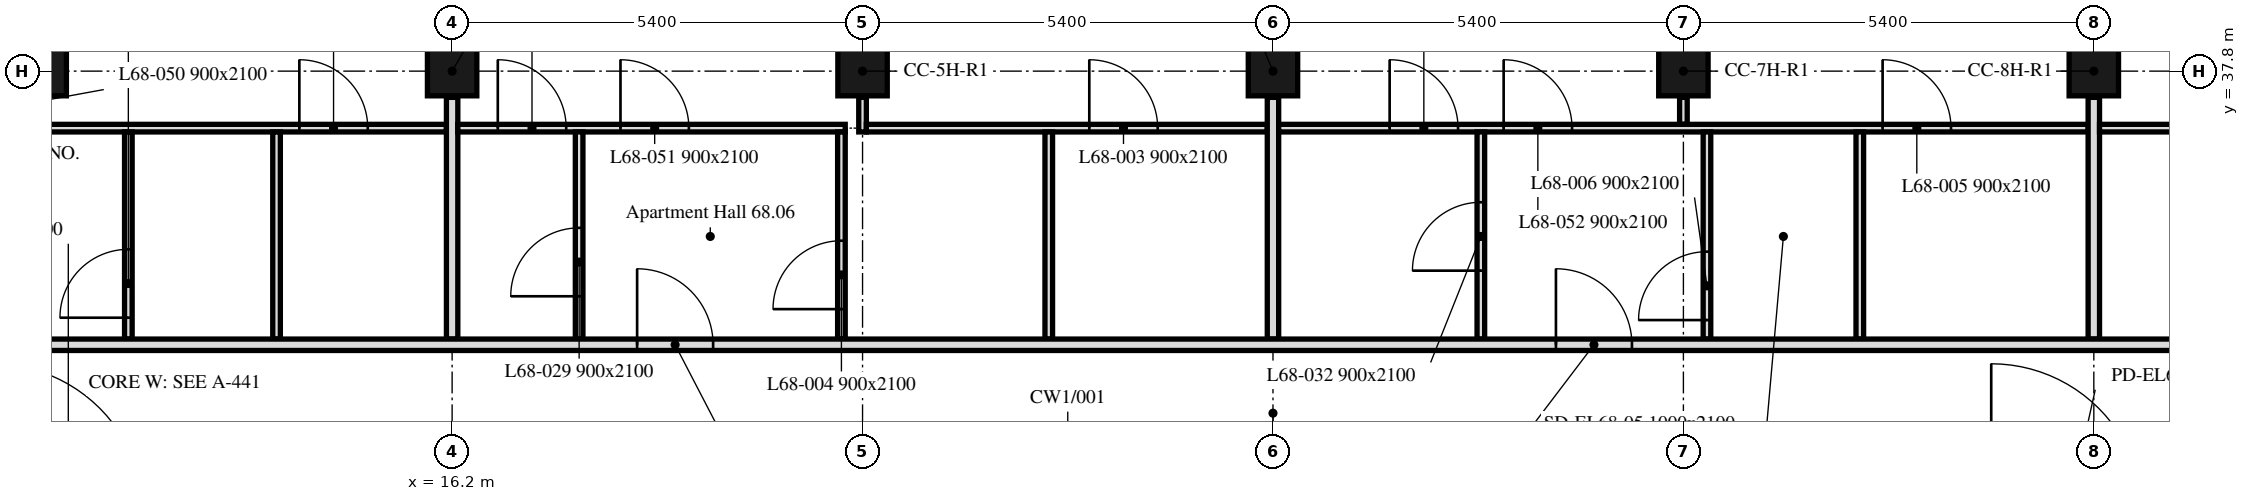
"""IFC4 building model, lengths in metres.
Left out: names, types, materials, properties, quantities, classifications, styles, units other than length and angle.
Written with IfcOpenShell. Run it as: python <this file> out.ifc"""

import sys

from ifc_helpers import new_model, si_unit, direction, frame, frame_2d, origin, origin_2d, place, context, subcontext, project, spatial, rectangle, extrude, element, fill, save


model = new_model("IFC4")
c1 = context("Model", 3, precision=1e-05, world=origin(), true_north=direction((0.0, 1.0)))
c2 = subcontext(c1, "Body", "Model", "MODEL_VIEW")
j1 = project(units=[si_unit("LENGTHUNIT", "METRE"), si_unit("PLANEANGLEUNIT", "RADIAN")], contexts=[c1])
p1 = place(None, origin())
s1 = spatial("IfcSite", under=j1, at=p1, CompositionType="ELEMENT")
p2 = place(p1, origin())
s2 = spatial("IfcBuilding", under=s1, at=p2, CompositionType="ELEMENT")
p3 = place(p2, frame((0.0, 0.0, 278.5)))
s3 = spatial("IfcBuildingStorey", under=s2, at=p3, CompositionType="ELEMENT", Elevation=278.5)
for number, where, z_axis, x_axis in (
    (1, (10.8, 37.8, 0.0), (0.0, 0.0, 1.0), (1.0, 0.0, 0.0)),
    (2, (16.2, 37.8, 0.0), (0.0, 0.0, 1.0), (1.0, 0.0, 0.0)),
    (3, (21.6, 37.8, 0.0), (0.0, 0.0, 1.0), (1.0, 0.0, 0.0)),
    (4, (27.0, 37.8, 0.0), (0.0, 0.0, 1.0), (1.0, 0.0, 0.0)),
    (5, (32.4, 37.8, 0.0), (0.0, 0.0, 1.0), (1.0, 0.0, 0.0)),
    (6, (37.8, 37.8, 0.0), (0.0, 0.0, 1.0), (1.0, 0.0, 0.0)),
):
    element("IfcColumn", number, at=place(p3, frame(where, z_axis=z_axis, x_axis=x_axis)), inside=s3, PredefinedType="COLUMN", context=c2, shape_type="SweptSolid", body=[
        extrude(rectangle(XDim=0.65, YDim=0.65, at=origin_2d()), origin(), (0.0, 0.0, 1.0), 3.0),
    ])
p4 = place(p3, frame((10.949, 42.501, 0.0), z_axis=(0.0, 0.0, 1.0), x_axis=(-0.707106781187, -0.707106781187, 0.0)))
e7 = element("IfcWall", 7, at=p4, inside=s3, PredefinedType="SOLIDWALL", context=c2, shape_type="SweptSolid", body=[
    extrude(rectangle(XDim=6.86, YDim=0.3, at=frame_2d((3.43, 0.0))), origin(), (0.0, 0.0, 1.0), 3.0),
])
p5 = place(p4, frame((1.73, 0.0, 0.9)))
e8 = element("IfcOpeningElement", 8, at=p5, cuts=e7, PredefinedType="OPENING", context=c2, shape_type="SweptSolid", body=[
    extrude(rectangle(XDim=3.4, YDim=1.7, at=frame_2d((1.7, 0.85))), frame((0.0, 0.16, 0.0), z_axis=(0.0, -1.0, 0.0), x_axis=(1.0, 0.0, 0.0)), (0.0, 0.0, 1.0), 0.32),
])
p6 = place(p3, frame((6.151, 37.05, 0.0), z_axis=(0.0, 0.0, 1.0), x_axis=(1.0, 0.0, 0.0)))
e9 = element("IfcWall", 9, at=p6, inside=s3, PredefinedType="PARTITIONING", context=c2, shape_type="SweptSolid", body=[
    extrude(rectangle(XDim=9.974, YDim=0.1, at=frame_2d((4.987, 0.0))), origin(), (0.0, 0.0, 1.0), 3.0),
])
p7 = place(p6, frame((8.039, 0.0, 0.0)))
e10 = element("IfcOpeningElement", 10, at=p7, cuts=e9, PredefinedType="OPENING", context=c2, shape_type="SweptSolid", body=[
    extrude(rectangle(XDim=0.9, YDim=2.1, at=frame_2d((0.45, 1.05))), frame((0.0, 0.05, 0.0), z_axis=(0.0, -1.0, 0.0), x_axis=(1.0, 0.0, 0.0)), (0.0, 0.0, 1.0), 0.1),
])
p8 = place(p6, frame((0.879, 0.0, 0.0)))
e11 = element("IfcOpeningElement", 11, at=p8, cuts=e9, PredefinedType="OPENING", context=c2, shape_type="SweptSolid", body=[
    extrude(rectangle(XDim=0.9, YDim=2.1, at=frame_2d((0.45, 1.05))), frame((0.0, 0.05, 0.0), z_axis=(0.0, -1.0, 0.0), x_axis=(1.0, 0.0, 0.0)), (0.0, 0.0, 1.0), 0.1),
])
p9 = place(p6, frame((2.249, 0.0, 0.0)))
e12 = element("IfcOpeningElement", 12, at=p9, cuts=e9, PredefinedType="OPENING", context=c2, shape_type="SweptSolid", body=[
    extrude(rectangle(XDim=0.9, YDim=2.1, at=frame_2d((0.45, 1.05))), frame((0.0, 0.05, 0.0), z_axis=(0.0, -1.0, 0.0), x_axis=(1.0, 0.0, 0.0)), (0.0, 0.0, 1.0), 0.1),
])
p10 = place(p3, frame((11.94, 34.275, 0.0), z_axis=(0.0, 0.0, 1.0), x_axis=(0.0, 1.0, 0.0)))
e13 = element("IfcWall", 13, at=p10, inside=s3, PredefinedType="PARTITIONING", context=c2, shape_type="SweptSolid", body=[
    extrude(rectangle(XDim=2.725, YDim=0.1, at=frame_2d((1.363, 0.0))), origin(), (0.0, 0.0, 1.0), 3.0),
])
p11 = place(p10, frame((0.281, 0.0, 0.0)))
e14 = element("IfcOpeningElement", 14, at=p11, cuts=e13, PredefinedType="OPENING", context=c2, shape_type="SweptSolid", body=[
    extrude(rectangle(XDim=0.9, YDim=2.1, at=frame_2d((0.45, 1.05))), frame((0.0, 0.05, 0.0), z_axis=(0.0, -1.0, 0.0), x_axis=(1.0, 0.0, 0.0)), (0.0, 0.0, 1.0), 0.1),
])
p12 = place(p3, frame((13.89, 34.275, 0.0), z_axis=(0.0, 0.0, 1.0), x_axis=(0.0, 1.0, 0.0)))
e15 = element("IfcWall", 15, at=p12, inside=s3, PredefinedType="PARTITIONING", context=c2, shape_type="SweptSolid", body=[
    extrude(rectangle(XDim=2.725, YDim=0.1, at=frame_2d((1.363, 0.0))), origin(), (0.0, 0.0, 1.0), 3.0),
])
p13 = place(p3, frame((16.2, 34.275, 0.0), z_axis=(0.0, 0.0, 1.0), x_axis=(0.0, 1.0, 0.0)))
e16 = element("IfcWall", 16, at=p13, inside=s3, PredefinedType="PARTITIONING", context=c2, shape_type="SweptSolid", body=[
    extrude(rectangle(XDim=3.18, YDim=0.15, at=frame_2d((1.59, 0.0))), origin(), (0.0, 0.0, 1.0), 3.0),
])
p14 = place(p3, frame((16.275, 37.05, 0.0), z_axis=(0.0, 0.0, 1.0), x_axis=(1.0, 0.0, 0.0)))
e17 = element("IfcWall", 17, at=p14, inside=s3, PredefinedType="PARTITIONING", context=c2, shape_type="SweptSolid", body=[
    extrude(rectangle(XDim=5.097, YDim=0.1, at=frame_2d((2.549, 0.0))), origin(), (0.0, 0.0, 1.0), 3.0),
])
p15 = place(p14, frame((0.526, 0.0, 0.0)))
e18 = element("IfcOpeningElement", 18, at=p15, cuts=e17, PredefinedType="OPENING", context=c2, shape_type="SweptSolid", body=[
    extrude(rectangle(XDim=0.9, YDim=2.1, at=frame_2d((0.45, 1.05))), frame((0.0, 0.05, 0.0), z_axis=(0.0, -1.0, 0.0), x_axis=(1.0, 0.0, 0.0)), (0.0, 0.0, 1.0), 0.1),
])
p16 = place(p14, frame((2.14, 0.0, 0.0)))
e19 = element("IfcOpeningElement", 19, at=p16, cuts=e17, PredefinedType="OPENING", context=c2, shape_type="SweptSolid", body=[
    extrude(rectangle(XDim=0.9, YDim=2.1, at=frame_2d((0.45, 1.05))), frame((0.0, 0.05, 0.0), z_axis=(0.0, -1.0, 0.0), x_axis=(1.0, 0.0, 0.0)), (0.0, 0.0, 1.0), 0.1),
])
p17 = place(p3, frame((21.6, 37.0, 0.0), z_axis=(0.0, 0.0, 1.0), x_axis=(0.0, 1.0, 0.0)))
e20 = element("IfcWall", 20, at=p17, inside=s3, PredefinedType="PARTITIONING", context=c2, shape_type="SweptSolid", body=[
    extrude(rectangle(XDim=0.455, YDim=0.1, at=frame_2d((0.228, 0.0))), origin(), (0.0, 0.0, 1.0), 3.0),
])
p18 = place(p3, frame((21.65, 37.05, 0.0), z_axis=(0.0, 0.0, 1.0), x_axis=(1.0, 0.0, 0.0)))
e21 = element("IfcWall", 21, at=p18, inside=s3, PredefinedType="PARTITIONING", context=c2, shape_type="SweptSolid", body=[
    extrude(rectangle(XDim=5.275, YDim=0.1, at=frame_2d((2.638, 0.0))), origin(), (0.0, 0.0, 1.0), 3.0),
])
p19 = place(p18, frame((2.933, 0.0, 0.0)))
e22 = element("IfcOpeningElement", 22, at=p19, cuts=e21, PredefinedType="OPENING", context=c2, shape_type="SweptSolid", body=[
    extrude(rectangle(XDim=0.9, YDim=2.1, at=frame_2d((0.45, 1.05))), frame((0.0, 0.05, 0.0), z_axis=(0.0, -1.0, 0.0), x_axis=(1.0, 0.0, 0.0)), (0.0, 0.0, 1.0), 0.1),
])
p20 = place(p3, frame((17.871, 34.275, 0.0), z_axis=(0.0, 0.0, 1.0), x_axis=(0.0, 1.0, 0.0)))
e23 = element("IfcWall", 23, at=p20, inside=s3, PredefinedType="PARTITIONING", context=c2, shape_type="SweptSolid", body=[
    extrude(rectangle(XDim=2.725, YDim=0.1, at=frame_2d((1.363, 0.0))), origin(), (0.0, 0.0, 1.0), 3.0),
])
p21 = place(p20, frame((0.563, 0.0, 0.0)))
e24 = element("IfcOpeningElement", 24, at=p21, cuts=e23, PredefinedType="OPENING", context=c2, shape_type="SweptSolid", body=[
    extrude(rectangle(XDim=0.9, YDim=2.1, at=frame_2d((0.45, 1.05))), frame((0.0, 0.05, 0.0), z_axis=(0.0, -1.0, 0.0), x_axis=(1.0, 0.0, 0.0)), (0.0, 0.0, 1.0), 0.1),
])
p22 = place(p3, frame((21.322, 34.275, 0.0), z_axis=(0.0, 0.0, 1.0), x_axis=(0.0, 1.0, 0.0)))
e25 = element("IfcWall", 25, at=p22, inside=s3, PredefinedType="PARTITIONING", context=c2, shape_type="SweptSolid", body=[
    extrude(rectangle(XDim=2.725, YDim=0.1, at=frame_2d((1.363, 0.0))), origin(), (0.0, 0.0, 1.0), 3.0),
])
p23 = place(p22, frame((0.394, 0.0, 0.0)))
e26 = element("IfcOpeningElement", 26, at=p23, cuts=e25, PredefinedType="OPENING", context=c2, shape_type="SweptSolid", body=[
    extrude(rectangle(XDim=0.9, YDim=2.1, at=frame_2d((0.45, 1.05))), frame((0.0, 0.05, 0.0), z_axis=(0.0, -1.0, 0.0), x_axis=(1.0, 0.0, 0.0)), (0.0, 0.0, 1.0), 0.1),
])
p24 = place(p3, frame((24.05, 34.275, 0.0), z_axis=(0.0, 0.0, 1.0), x_axis=(0.0, 1.0, 0.0)))
e27 = element("IfcWall", 27, at=p24, inside=s3, PredefinedType="PARTITIONING", context=c2, shape_type="SweptSolid", body=[
    extrude(rectangle(XDim=2.725, YDim=0.1, at=frame_2d((1.363, 0.0))), origin(), (0.0, 0.0, 1.0), 3.0),
])
p25 = place(p3, frame((27.0, 34.275, 0.0), z_axis=(0.0, 0.0, 1.0), x_axis=(0.0, 1.0, 0.0)))
e28 = element("IfcWall", 28, at=p25, inside=s3, PredefinedType="PARTITIONING", context=c2, shape_type="SweptSolid", body=[
    extrude(rectangle(XDim=3.18, YDim=0.15, at=frame_2d((1.59, 0.0))), origin(), (0.0, 0.0, 1.0), 3.0),
])
p26 = place(p3, frame((32.4, 37.1, 0.0), z_axis=(0.0, 0.0, 1.0), x_axis=(0.0, 1.0, 0.0)))
e29 = element("IfcWall", 29, at=p26, inside=s3, PredefinedType="PARTITIONING", context=c2, shape_type="SweptSolid", body=[
    extrude(rectangle(XDim=0.355, YDim=0.1, at=frame_2d((0.177, 0.0))), origin(), (0.0, 0.0, 1.0), 3.0),
])
p27 = place(p3, frame((27.075, 37.05, 0.0), z_axis=(0.0, 0.0, 1.0), x_axis=(1.0, 0.0, 0.0)))
e30 = element("IfcWall", 30, at=p27, inside=s3, PredefinedType="PARTITIONING", context=c2, shape_type="SweptSolid", body=[
    extrude(rectangle(XDim=10.65, YDim=0.1, at=frame_2d((5.325, 0.0))), origin(), (0.0, 0.0, 1.0), 3.0),
])
p28 = place(p27, frame((7.946, 0.0, 0.0)))
e31 = element("IfcOpeningElement", 31, at=p28, cuts=e30, PredefinedType="OPENING", context=c2, shape_type="SweptSolid", body=[
    extrude(rectangle(XDim=0.9, YDim=2.1, at=frame_2d((0.45, 1.05))), frame((0.0, 0.05, 0.0), z_axis=(0.0, -1.0, 0.0), x_axis=(1.0, 0.0, 0.0)), (0.0, 0.0, 1.0), 0.1),
])
p29 = place(p27, frame((1.46, 0.0, 0.0)))
e32 = element("IfcOpeningElement", 32, at=p29, cuts=e30, PredefinedType="OPENING", context=c2, shape_type="SweptSolid", body=[
    extrude(rectangle(XDim=0.9, YDim=2.1, at=frame_2d((0.45, 1.05))), frame((0.0, 0.05, 0.0), z_axis=(0.0, -1.0, 0.0), x_axis=(1.0, 0.0, 0.0)), (0.0, 0.0, 1.0), 0.1),
])
p30 = place(p27, frame((2.96, 0.0, 0.0)))
e33 = element("IfcOpeningElement", 33, at=p30, cuts=e30, PredefinedType="OPENING", context=c2, shape_type="SweptSolid", body=[
    extrude(rectangle(XDim=0.9, YDim=2.1, at=frame_2d((0.45, 1.05))), frame((0.0, 0.05, 0.0), z_axis=(0.0, -1.0, 0.0), x_axis=(1.0, 0.0, 0.0)), (0.0, 0.0, 1.0), 0.1),
])
p31 = place(p3, frame((29.735, 34.275, 0.0), z_axis=(0.0, 0.0, 1.0), x_axis=(0.0, 1.0, 0.0)))
e34 = element("IfcWall", 34, at=p31, inside=s3, PredefinedType="PARTITIONING", context=c2, shape_type="SweptSolid", body=[
    extrude(rectangle(XDim=2.725, YDim=0.1, at=frame_2d((1.363, 0.0))), origin(), (0.0, 0.0, 1.0), 3.0),
])
p32 = place(p31, frame((0.9, 0.0, 0.0)))
e35 = element("IfcOpeningElement", 35, at=p32, cuts=e34, PredefinedType="OPENING", context=c2, shape_type="SweptSolid", body=[
    extrude(rectangle(XDim=0.9, YDim=2.1, at=frame_2d((0.45, 1.05))), frame((0.0, 0.05, 0.0), z_axis=(0.0, -1.0, 0.0), x_axis=(1.0, 0.0, 0.0)), (0.0, 0.0, 1.0), 0.1),
])
p33 = place(p3, frame((32.71, 34.275, 0.0), z_axis=(0.0, 0.0, 1.0), x_axis=(0.0, 1.0, 0.0)))
e36 = element("IfcWall", 36, at=p33, inside=s3, PredefinedType="PARTITIONING", context=c2, shape_type="SweptSolid", body=[
    extrude(rectangle(XDim=2.725, YDim=0.1, at=frame_2d((1.363, 0.0))), origin(), (0.0, 0.0, 1.0), 3.0),
])
p34 = place(p33, frame((0.25, 0.0, 0.0)))
e37 = element("IfcOpeningElement", 37, at=p34, cuts=e36, PredefinedType="OPENING", context=c2, shape_type="SweptSolid", body=[
    extrude(rectangle(XDim=0.9, YDim=2.1, at=frame_2d((0.45, 1.05))), frame((0.0, 0.05, 0.0), z_axis=(0.0, -1.0, 0.0), x_axis=(1.0, 0.0, 0.0)), (0.0, 0.0, 1.0), 0.1),
])
p35 = place(p3, frame((34.721, 34.275, 0.0), z_axis=(0.0, 0.0, 1.0), x_axis=(0.0, 1.0, 0.0)))
e38 = element("IfcWall", 38, at=p35, inside=s3, PredefinedType="PARTITIONING", context=c2, shape_type="SweptSolid", body=[
    extrude(rectangle(XDim=2.725, YDim=0.1, at=frame_2d((1.363, 0.0))), origin(), (0.0, 0.0, 1.0), 3.0),
])
p36 = place(p3, frame((37.8, 34.275, 0.0), z_axis=(0.0, 0.0, 1.0), x_axis=(0.0, 1.0, 0.0)))
e39 = element("IfcWall", 39, at=p36, inside=s3, PredefinedType="PARTITIONING", context=c2, shape_type="SweptSolid", body=[
    extrude(rectangle(XDim=3.18, YDim=0.15, at=frame_2d((1.59, 0.0))), origin(), (0.0, 0.0, 1.0), 3.0),
])
p37 = place(p3, frame((37.875, 37.05, 0.0), z_axis=(0.0, 0.0, 1.0), x_axis=(1.0, 0.0, 0.0)))
e40 = element("IfcWall", 40, at=p37, inside=s3, PredefinedType="PARTITIONING", context=c2, shape_type="SweptSolid", body=[
    extrude(rectangle(XDim=9.974, YDim=0.1, at=frame_2d((4.987, 0.0))), origin(), (0.0, 0.0, 1.0), 3.0),
])
p38 = place(p37, frame((1.519, 0.0, 0.0)))
e41 = element("IfcOpeningElement", 41, at=p38, cuts=e40, PredefinedType="OPENING", context=c2, shape_type="SweptSolid", body=[
    extrude(rectangle(XDim=0.9, YDim=2.1, at=frame_2d((0.45, 1.05))), frame((0.0, 0.05, 0.0), z_axis=(0.0, -1.0, 0.0), x_axis=(1.0, 0.0, 0.0)), (0.0, 0.0, 1.0), 0.1),
])
p39 = place(p37, frame((3.019, 0.0, 0.0)))
e42 = element("IfcOpeningElement", 42, at=p39, cuts=e40, PredefinedType="OPENING", context=c2, shape_type="SweptSolid", body=[
    extrude(rectangle(XDim=0.9, YDim=2.1, at=frame_2d((0.45, 1.05))), frame((0.0, 0.05, 0.0), z_axis=(0.0, -1.0, 0.0), x_axis=(1.0, 0.0, 0.0)), (0.0, 0.0, 1.0), 0.1),
])
p40 = place(p3, frame((6.151, 34.2, 0.0), z_axis=(0.0, 0.0, 1.0), x_axis=(1.0, 0.0, 0.0)))
e43 = element("IfcWall", 43, at=p40, inside=s3, PredefinedType="PARTITIONING", context=c2, shape_type="SweptSolid", body=[
    extrude(rectangle(XDim=41.698, YDim=0.15, at=frame_2d((20.849, 0.0))), origin(), (0.0, 0.0, 1.0), 3.0),
])
p41 = place(p40, frame((3.369, 0.0, 0.0)))
e44 = element("IfcOpeningElement", 44, at=p41, cuts=e43, PredefinedType="OPENING", context=c2, shape_type="SweptSolid", body=[
    extrude(rectangle(XDim=1.0, YDim=2.1, at=frame_2d((0.5, 1.05))), frame((0.0, 0.075, 0.0), z_axis=(0.0, -1.0, 0.0), x_axis=(1.0, 0.0, 0.0)), (0.0, 0.0, 1.0), 0.15),
])
p42 = place(p40, frame((12.483, 0.0, 0.0)))
e45 = element("IfcOpeningElement", 45, at=p42, cuts=e43, PredefinedType="OPENING", context=c2, shape_type="SweptSolid", body=[
    extrude(rectangle(XDim=1.0, YDim=2.1, at=frame_2d((0.5, 1.05))), frame((0.0, 0.075, 0.0), z_axis=(0.0, -1.0, 0.0), x_axis=(1.0, 0.0, 0.0)), (0.0, 0.0, 1.0), 0.15),
])
p43 = place(p40, frame((24.572, 0.0, 0.0)))
e46 = element("IfcOpeningElement", 46, at=p43, cuts=e43, PredefinedType="OPENING", context=c2, shape_type="SweptSolid", body=[
    extrude(rectangle(XDim=1.0, YDim=2.1, at=frame_2d((0.5, 1.05))), frame((0.0, 0.075, 0.0), z_axis=(0.0, -1.0, 0.0), x_axis=(1.0, 0.0, 0.0)), (0.0, 0.0, 1.0), 0.15),
])
p44 = place(p40, frame((35.849, 0.0, 0.0)))
e47 = element("IfcOpeningElement", 47, at=p44, cuts=e43, PredefinedType="OPENING", context=c2, shape_type="SweptSolid", body=[
    extrude(rectangle(XDim=1.0, YDim=2.1, at=frame_2d((0.5, 1.05))), frame((0.0, 0.075, 0.0), z_axis=(0.0, -1.0, 0.0), x_axis=(1.0, 0.0, 0.0)), (0.0, 0.0, 1.0), 0.15),
])
p45 = place(p7, origin())
e48 = element("IfcDoor", 48, at=p45, inside=s3, OperationType="SINGLE_SWING_LEFT", PredefinedType="DOOR", context=c2, shape_type="SweptSolid", body=[
    extrude(rectangle(XDim=0.9, YDim=2.1, at=frame_2d((0.45, 1.05))), frame((0.0, 0.025, 0.0), z_axis=(0.0, -1.0, 0.0), x_axis=(1.0, 0.0, 0.0)), (0.0, 0.0, 1.0), 0.05),
])
fill(e10, e48)
p46 = place(p11, origin())
e49 = element("IfcDoor", 49, at=p46, inside=s3, OperationType="SINGLE_SWING_LEFT", PredefinedType="DOOR", context=c2, shape_type="SweptSolid", body=[
    extrude(rectangle(XDim=0.9, YDim=2.1, at=frame_2d((0.45, 1.05))), frame((0.0, 0.025, 0.0), z_axis=(0.0, -1.0, 0.0), x_axis=(1.0, 0.0, 0.0)), (0.0, 0.0, 1.0), 0.05),
])
fill(e14, e49)
p47 = place(p19, origin())
e50 = element("IfcDoor", 50, at=p47, inside=s3, OperationType="SINGLE_SWING_LEFT", PredefinedType="DOOR", context=c2, shape_type="SweptSolid", body=[
    extrude(rectangle(XDim=0.9, YDim=2.1, at=frame_2d((0.45, 1.05))), frame((0.0, 0.025, 0.0), z_axis=(0.0, -1.0, 0.0), x_axis=(1.0, 0.0, 0.0)), (0.0, 0.0, 1.0), 0.05),
])
fill(e22, e50)
p48 = place(p23, origin())
e51 = element("IfcDoor", 51, at=p48, inside=s3, OperationType="SINGLE_SWING_RIGHT", PredefinedType="DOOR", context=c2, shape_type="SweptSolid", body=[
    extrude(rectangle(XDim=0.9, YDim=2.1, at=frame_2d((0.45, 1.05))), frame((0.0, 0.025, 0.0), z_axis=(0.0, -1.0, 0.0), x_axis=(1.0, 0.0, 0.0)), (0.0, 0.0, 1.0), 0.05),
])
fill(e26, e51)
p49 = place(p28, origin())
e52 = element("IfcDoor", 52, at=p49, inside=s3, OperationType="SINGLE_SWING_LEFT", PredefinedType="DOOR", context=c2, shape_type="SweptSolid", body=[
    extrude(rectangle(XDim=0.9, YDim=2.1, at=frame_2d((0.45, 1.05))), frame((0.0, 0.025, 0.0), z_axis=(0.0, -1.0, 0.0), x_axis=(1.0, 0.0, 0.0)), (0.0, 0.0, 1.0), 0.05),
])
fill(e31, e52)
p50 = place(p34, origin())
e53 = element("IfcDoor", 53, at=p50, inside=s3, OperationType="SINGLE_SWING_LEFT", PredefinedType="DOOR", context=c2, shape_type="SweptSolid", body=[
    extrude(rectangle(XDim=0.9, YDim=2.1, at=frame_2d((0.45, 1.05))), frame((0.0, 0.025, 0.0), z_axis=(0.0, -1.0, 0.0), x_axis=(1.0, 0.0, 0.0)), (0.0, 0.0, 1.0), 0.05),
])
fill(e37, e53)
p51 = place(p15, origin())
e54 = element("IfcDoor", 54, at=p51, inside=s3, OperationType="SINGLE_SWING_RIGHT", PredefinedType="DOOR", context=c2, shape_type="SweptSolid", body=[
    extrude(rectangle(XDim=0.9, YDim=2.1, at=frame_2d((0.45, 1.05))), frame((0.0, 0.025, 0.0), z_axis=(0.0, -1.0, 0.0), x_axis=(1.0, 0.0, 0.0)), (0.0, 0.0, 1.0), 0.05),
])
fill(e18, e54)
p52 = place(p21, origin())
e55 = element("IfcDoor", 55, at=p52, inside=s3, OperationType="SINGLE_SWING_RIGHT", PredefinedType="DOOR", context=c2, shape_type="SweptSolid", body=[
    extrude(rectangle(XDim=0.9, YDim=2.1, at=frame_2d((0.45, 1.05))), frame((0.0, 0.025, 0.0), z_axis=(0.0, -1.0, 0.0), x_axis=(1.0, 0.0, 0.0)), (0.0, 0.0, 1.0), 0.05),
])
fill(e24, e55)
p53 = place(p29, origin())
e56 = element("IfcDoor", 56, at=p53, inside=s3, OperationType="SINGLE_SWING_RIGHT", PredefinedType="DOOR", context=c2, shape_type="SweptSolid", body=[
    extrude(rectangle(XDim=0.9, YDim=2.1, at=frame_2d((0.45, 1.05))), frame((0.0, 0.025, 0.0), z_axis=(0.0, -1.0, 0.0), x_axis=(1.0, 0.0, 0.0)), (0.0, 0.0, 1.0), 0.05),
])
fill(e32, e56)
p54 = place(p32, origin())
e57 = element("IfcDoor", 57, at=p54, inside=s3, OperationType="SINGLE_SWING_LEFT", PredefinedType="DOOR", context=c2, shape_type="SweptSolid", body=[
    extrude(rectangle(XDim=0.9, YDim=2.1, at=frame_2d((0.45, 1.05))), frame((0.0, 0.025, 0.0), z_axis=(0.0, -1.0, 0.0), x_axis=(1.0, 0.0, 0.0)), (0.0, 0.0, 1.0), 0.05),
])
fill(e35, e57)
p55 = place(p16, origin())
e58 = element("IfcDoor", 58, at=p55, inside=s3, OperationType="SINGLE_SWING_LEFT", PredefinedType="DOOR", context=c2, shape_type="SweptSolid", body=[
    extrude(rectangle(XDim=0.9, YDim=2.1, at=frame_2d((0.45, 1.05))), frame((0.0, 0.025, 0.0), z_axis=(0.0, -1.0, 0.0), x_axis=(1.0, 0.0, 0.0)), (0.0, 0.0, 1.0), 0.05),
])
fill(e19, e58)
p56 = place(p30, origin())
e59 = element("IfcDoor", 59, at=p56, inside=s3, OperationType="SINGLE_SWING_LEFT", PredefinedType="DOOR", context=c2, shape_type="SweptSolid", body=[
    extrude(rectangle(XDim=0.9, YDim=2.1, at=frame_2d((0.45, 1.05))), frame((0.0, 0.025, 0.0), z_axis=(0.0, -1.0, 0.0), x_axis=(1.0, 0.0, 0.0)), (0.0, 0.0, 1.0), 0.05),
])
fill(e33, e59)
p57 = place(p42, origin())
e60 = element("IfcDoor", 60, at=p57, inside=s3, OperationType="SINGLE_SWING_RIGHT", PredefinedType="DOOR", context=c2, shape_type="SweptSolid", body=[
    extrude(rectangle(XDim=1.0, YDim=2.1, at=frame_2d((0.5, 1.05))), frame((0.0, 0.025, 0.0), z_axis=(0.0, -1.0, 0.0), x_axis=(1.0, 0.0, 0.0)), (0.0, 0.0, 1.0), 0.05),
])
fill(e45, e60)
p58 = place(p43, origin())
e61 = element("IfcDoor", 61, at=p58, inside=s3, OperationType="SINGLE_SWING_LEFT", PredefinedType="DOOR", context=c2, shape_type="SweptSolid", body=[
    extrude(rectangle(XDim=1.0, YDim=2.1, at=frame_2d((0.5, 1.05))), frame((0.0, 0.025, 0.0), z_axis=(0.0, -1.0, 0.0), x_axis=(1.0, 0.0, 0.0)), (0.0, 0.0, 1.0), 0.05),
])
fill(e46, e61)
save(model, sys.argv[1])
